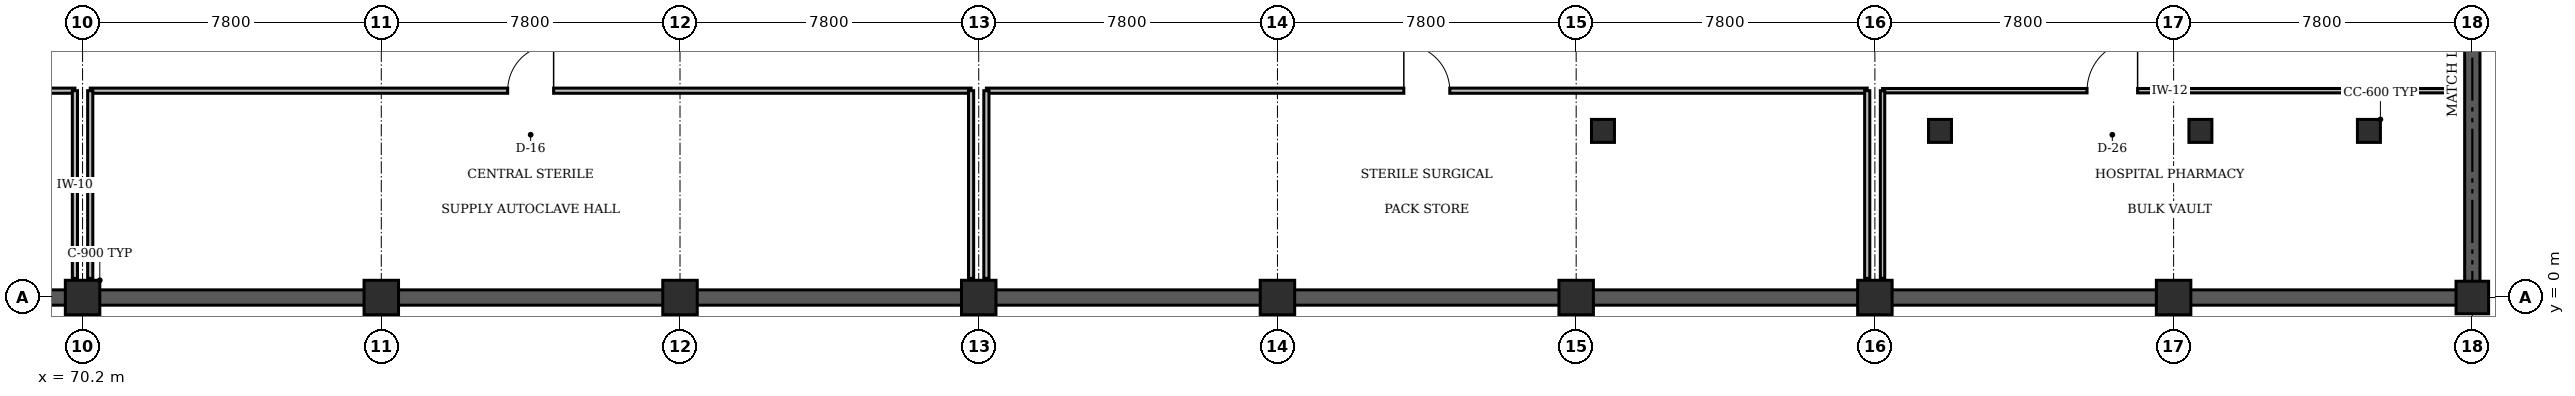
"""IFC4 building model, lengths in metres.
Left out: names, types, materials, properties, quantities, classifications, styles, units other than length and angle.
Written with IfcOpenShell. Run it as: python <this file> out.ifc"""

import sys

from ifc_helpers import new_model, si_unit, direction, frame, frame_2d, origin, origin_with_axes, origin_2d, place, context, subcontext, project, spatial, rectangle, circle, extrude, element, fill, save


model = new_model("IFC4")
c1 = context("Model", 3, precision=1e-05, world=origin(), true_north=direction((0.0, 1.0)))
c2 = subcontext(c1, "Body", "Model", "MODEL_VIEW")
j1 = project(units=[si_unit("LENGTHUNIT", "METRE"), si_unit("PLANEANGLEUNIT", "RADIAN")], contexts=[c1])
p1 = place(None, origin())
s1 = spatial("IfcSite", under=j1, at=p1, CompositionType="ELEMENT")
p2 = place(p1, origin())
s2 = spatial("IfcBuilding", under=s1, at=p2, CompositionType="ELEMENT")
p3 = place(p2, frame((0.0, 0.0, -4.8)))
s3 = spatial("IfcBuildingStorey", under=s2, at=p3, CompositionType="ELEMENT", Elevation=-4.8)
p4 = place(p3, origin_with_axes())
e1 = element("IfcWall", 1, at=p4, inside=s3, PredefinedType="SOLIDWALL", context=c2, shape_type="SweptSolid", body=[
    extrude(rectangle(XDim=132.6, YDim=0.4, at=frame_2d((66.3, 0.0))), origin(), (0.0, 0.0, 1.0), 4.8),
])
p5 = place(p3, frame((132.6, 0.0, 0.0), z_axis=(0.0, 0.0, 1.0), x_axis=(0.0, 1.0, 0.0)))
e2 = element("IfcWall", 2, at=p5, inside=s3, PredefinedType="SOLIDWALL", context=c2, shape_type="SweptSolid", body=[
    extrude(rectangle(XDim=42.0, YDim=0.4, at=frame_2d((21.0, 0.0))), origin(), (0.0, 0.0, 1.0), 4.8),
])
for number, where, z_axis, x_axis in (
    (3, (70.2, 0.0, 0.0), (0.0, 0.0, 1.0), (1.0, 0.0, 0.0)),
    (4, (78.0, 0.0, 0.0), (0.0, 0.0, 1.0), (1.0, 0.0, 0.0)),
    (5, (85.8, 0.0, 0.0), (0.0, 0.0, 1.0), (1.0, 0.0, 0.0)),
    (6, (93.6, 0.0, 0.0), (0.0, 0.0, 1.0), (1.0, 0.0, 0.0)),
    (7, (101.4, 0.0, 0.0), (0.0, 0.0, 1.0), (1.0, 0.0, 0.0)),
    (8, (109.2, 0.0, 0.0), (0.0, 0.0, 1.0), (1.0, 0.0, 0.0)),
    (9, (117.0, 0.0, 0.0), (0.0, 0.0, 1.0), (1.0, 0.0, 0.0)),
    (10, (124.8, 0.0, 0.0), (0.0, 0.0, 1.0), (1.0, 0.0, 0.0)),
):
    element("IfcColumn", number, at=place(p3, frame(where, z_axis=z_axis, x_axis=x_axis)), inside=s3, PredefinedType="COLUMN", context=c2, shape_type="SweptSolid", body=[
        extrude(rectangle(XDim=0.9, YDim=0.9, at=origin_2d()), origin(), (0.0, 0.0, 1.0), 4.8),
    ])
p6 = place(p3, frame((132.6, 0.0, 0.0), z_axis=(0.0, 0.0, 1.0), x_axis=(1.0, 0.0, 0.0)))
e11 = element("IfcColumn", 11, at=p6, inside=s3, PredefinedType="COLUMN", context=c2, shape_type="SweptSolid", body=[
    extrude(rectangle(XDim=0.85, YDim=0.85, at=origin_2d()), origin(), (0.0, 0.0, 1.0), 4.8),
])
for number, where, z_axis, x_axis in (
    (12, (129.9, 4.35, -0.4), (0.0, 0.0, 1.0), (1.0, 0.0, 0.0)),
    (13, (125.5, 4.35, -0.4), (0.0, 0.0, 1.0), (1.0, 0.0, 0.0)),
    (14, (118.7, 4.35, -0.4), (0.0, 0.0, 1.0), (1.0, 0.0, 0.0)),
    (15, (109.9, 4.35, -0.4), (0.0, 0.0, 1.0), (1.0, 0.0, 0.0)),
):
    element("IfcColumn", number, at=place(p3, frame(where, z_axis=z_axis, x_axis=x_axis)), inside=s3, PredefinedType="PILASTER", context=c2, shape_type="SweptSolid", body=[
        extrude(circle(Radius=0.3, at=origin_2d()), origin(), (0.0, 0.0, 1.0), 5.2),
    ])
p7 = place(p3, frame((46.8, 5.4, 0.0), z_axis=(0.0, 0.0, 1.0), x_axis=(1.0, 0.0, 0.0)))
e16 = element("IfcWall", 16, at=p7, inside=s3, PredefinedType="PARTITIONING", context=c2, shape_type="SweptSolid", body=[
    extrude(rectangle(XDim=23.2, YDim=0.135, at=frame_2d((11.6, 0.0))), origin(), (0.0, 0.0, 1.0), 4.46),
])
p8 = place(p7, frame((11.0, 0.0, 0.0)))
e17 = element("IfcOpeningElement", 17, at=p8, cuts=e16, PredefinedType="OPENING", context=c2, shape_type="SweptSolid", body=[
    extrude(rectangle(XDim=1.2, YDim=2.15, at=frame_2d((0.6, 1.075))), frame((0.0, 0.078, 0.0), z_axis=(0.0, -1.0, 0.0), x_axis=(1.0, 0.0, 0.0)), (0.0, 0.0, 1.0), 0.155),
])
p9 = place(p3, frame((70.0, 0.5, 0.0), z_axis=(0.0, 0.0, 1.0), x_axis=(0.0, 1.0, 0.0)))
e18 = element("IfcWall", 18, at=p9, inside=s3, PredefinedType="PARTITIONING", context=c2, shape_type="SweptSolid", body=[
    extrude(rectangle(XDim=4.9, YDim=0.135, at=frame_2d((2.45, 0.0))), origin(), (0.0, 0.0, 1.0), 3.515),
])
p10 = place(p3, frame((70.4, 5.4, 0.0), z_axis=(0.0, 0.0, 1.0), x_axis=(1.0, 0.0, 0.0)))
e19 = element("IfcWall", 19, at=p10, inside=s3, PredefinedType="PARTITIONING", context=c2, shape_type="SweptSolid", body=[
    extrude(rectangle(XDim=23.0, YDim=0.135, at=frame_2d((11.5, 0.0))), origin(), (0.0, 0.0, 1.0), 4.46),
])
p11 = place(p10, frame((10.9, 0.0, 0.0)))
e20 = element("IfcOpeningElement", 20, at=p11, cuts=e19, PredefinedType="OPENING", context=c2, shape_type="SweptSolid", body=[
    extrude(rectangle(XDim=1.2, YDim=2.15, at=frame_2d((0.6, 1.075))), frame((0.0, 0.078, 0.0), z_axis=(0.0, -1.0, 0.0), x_axis=(1.0, 0.0, 0.0)), (0.0, 0.0, 1.0), 0.155),
])
for number, where, z_axis, x_axis in (
    (21, (70.4, 0.5, 0.0), (0.0, 0.0, 1.0), (0.0, 1.0, 0.0)),
    (22, (93.4, 0.5, 0.0), (0.0, 0.0, 1.0), (0.0, 1.0, 0.0)),
):
    element("IfcWall", number, at=place(p3, frame(where, z_axis=z_axis, x_axis=x_axis)), inside=s3, PredefinedType="PARTITIONING", context=c2, shape_type="SweptSolid", body=[
        extrude(rectangle(XDim=4.9, YDim=0.135, at=frame_2d((2.45, 0.0))), origin(), (0.0, 0.0, 1.0), 3.515),
    ])
p12 = place(p3, frame((93.8, 5.4, 0.0), z_axis=(0.0, 0.0, 1.0), x_axis=(1.0, 0.0, 0.0)))
e23 = element("IfcWall", 23, at=p12, inside=s3, PredefinedType="PARTITIONING", context=c2, shape_type="SweptSolid", body=[
    extrude(rectangle(XDim=23.0, YDim=0.135, at=frame_2d((11.5, 0.0))), origin(), (0.0, 0.0, 1.0), 4.46),
])
p13 = place(p12, frame((10.9, 0.0, 0.0)))
e24 = element("IfcOpeningElement", 24, at=p13, cuts=e23, PredefinedType="OPENING", context=c2, shape_type="SweptSolid", body=[
    extrude(rectangle(XDim=1.2, YDim=2.15, at=frame_2d((0.6, 1.075))), frame((0.0, 0.078, 0.0), z_axis=(0.0, -1.0, 0.0), x_axis=(1.0, 0.0, 0.0)), (0.0, 0.0, 1.0), 0.155),
])
for number, where, z_axis, x_axis in (
    (25, (93.8, 0.5, 0.0), (0.0, 0.0, 1.0), (0.0, 1.0, 0.0)),
    (26, (116.8, 0.5, 0.0), (0.0, 0.0, 1.0), (0.0, 1.0, 0.0)),
):
    element("IfcWall", number, at=place(p3, frame(where, z_axis=z_axis, x_axis=x_axis)), inside=s3, PredefinedType="PARTITIONING", context=c2, shape_type="SweptSolid", body=[
        extrude(rectangle(XDim=4.9, YDim=0.135, at=frame_2d((2.45, 0.0))), origin(), (0.0, 0.0, 1.0), 3.515),
    ])
p14 = place(p3, frame((117.2, 5.4, 0.0), z_axis=(0.0, 0.0, 1.0), x_axis=(1.0, 0.0, 0.0)))
e27 = element("IfcWall", 27, at=p14, inside=s3, PredefinedType="PARTITIONING", context=c2, shape_type="SweptSolid", body=[
    extrude(rectangle(XDim=15.0, YDim=0.115, at=frame_2d((7.5, 0.0))), origin(), (0.0, 0.0, 1.0), 4.46),
])
p15 = place(p14, frame((5.34, 0.0, 0.0)))
e28 = element("IfcOpeningElement", 28, at=p15, cuts=e27, PredefinedType="OPENING", context=c2, shape_type="SweptSolid", body=[
    extrude(rectangle(XDim=1.32, YDim=2.15, at=frame_2d((0.66, 1.075))), frame((0.0, 0.067, 0.0), z_axis=(0.0, -1.0, 0.0), x_axis=(1.0, 0.0, 0.0)), (0.0, 0.0, 1.0), 0.135),
])
p16 = place(p3, frame((117.2, 0.5, 0.0), z_axis=(0.0, 0.0, 1.0), x_axis=(0.0, 1.0, 0.0)))
e29 = element("IfcWall", 29, at=p16, inside=s3, PredefinedType="PARTITIONING", context=c2, shape_type="SweptSolid", body=[
    extrude(rectangle(XDim=4.9, YDim=0.115, at=frame_2d((2.45, 0.0))), origin(), (0.0, 0.0, 1.0), 3.515),
])
p17 = place(p11, origin())
e30 = element("IfcDoor", 30, at=p17, inside=s3, OperationType="SINGLE_SWING_RIGHT", PredefinedType="DOOR", context=c2, shape_type="SweptSolid", body=[
    extrude(rectangle(XDim=1.2, YDim=2.15, at=frame_2d((0.6, 1.075))), frame((0.0, 0.025, 0.0), z_axis=(0.0, -1.0, 0.0), x_axis=(1.0, 0.0, 0.0)), (0.0, 0.0, 1.0), 0.05),
])
fill(e20, e30)
p18 = place(p13, origin())
e31 = element("IfcDoor", 31, at=p18, inside=s3, OperationType="SINGLE_SWING_LEFT", PredefinedType="DOOR", context=c2, shape_type="SweptSolid", body=[
    extrude(rectangle(XDim=1.2, YDim=2.15, at=frame_2d((0.6, 1.075))), frame((0.0, 0.025, 0.0), z_axis=(0.0, -1.0, 0.0), x_axis=(1.0, 0.0, 0.0)), (0.0, 0.0, 1.0), 0.05),
])
fill(e24, e31)
p19 = place(p15, origin())
e32 = element("IfcDoor", 32, at=p19, inside=s3, OperationType="SINGLE_SWING_RIGHT", PredefinedType="DOOR", context=c2, shape_type="SweptSolid", body=[
    extrude(rectangle(XDim=1.32, YDim=2.15, at=frame_2d((0.66, 1.075))), frame((0.0, 0.025, 0.0), z_axis=(0.0, -1.0, 0.0), x_axis=(1.0, 0.0, 0.0)), (0.0, 0.0, 1.0), 0.05),
])
fill(e28, e32)
save(model, sys.argv[1])
